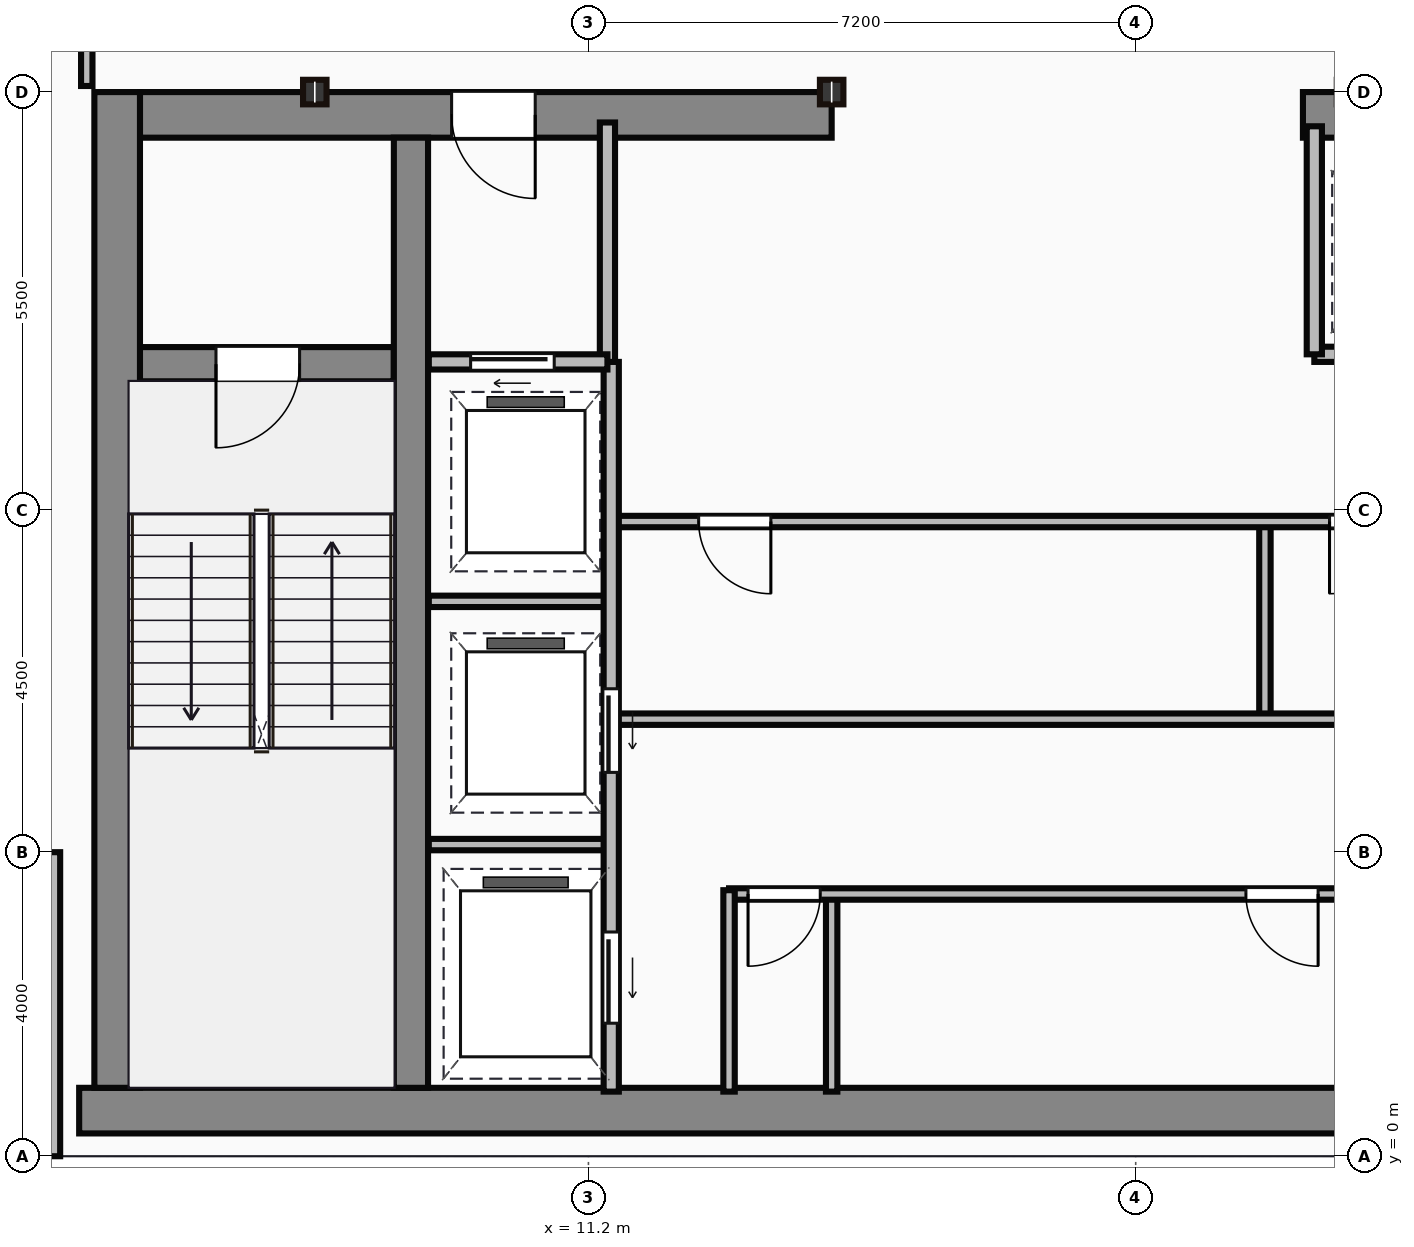
"""IFC4 building model, lengths in metres.
Left out: names, types, materials, properties, quantities, classifications, styles, units other than length and angle.
Written with IfcOpenShell. Run it as: python <this file> out.ifc"""

import sys

from ifc_helpers import new_model, si_unit, direction, frame, frame_2d, origin, origin_2d, place, context, subcontext, project, spatial, rectangle, i_section, extrude, source, transform, mapped, element, fill, save


model = new_model("IFC4")
c1 = context("Model", 3, precision=1e-05, world=origin(), true_north=direction((0.0, 1.0)))
c2 = subcontext(c1, "Body", "Model", "MODEL_VIEW")
j1 = project(units=[si_unit("LENGTHUNIT", "METRE"), si_unit("PLANEANGLEUNIT", "RADIAN")], contexts=[c1])
p1 = place(None, origin())
s1 = spatial("IfcSite", under=j1, at=p1, CompositionType="ELEMENT")
p2 = place(p1, origin())
s2 = spatial("IfcBuilding", under=s1, at=p2, CompositionType="ELEMENT")
p3 = place(p2, frame((0.0, 0.0, 288.0)))
s3 = spatial("IfcBuildingStorey", under=s2, at=p3, CompositionType="ELEMENT", Elevation=288.0)
m1 = source(origin(), c2, "Body", "SweptSolid", [
    extrude(rectangle(XDim=29.5, YDim=0.6, at=frame_2d((14.75, 0.0))), origin(), (0.0, 0.0, 1.0), 4.25),
])
p4 = place(p3, frame((4.5, 0.6, 0.0), z_axis=(0.0, 0.0, 1.0), x_axis=(1.0, 0.0, 0.0)))
e1 = element("IfcWall", 1, at=p4, inside=s3, PredefinedType="SHEAR", context=c2, shape_type="MappedRepresentation", body=[
    mapped(m1, transform((0.0, 0.0, 0.0))),
])
m2 = source(origin(), c2, "Body", "SweptSolid", [
    extrude(rectangle(XDim=13.1, YDim=0.6, at=frame_2d((6.55, 0.0))), origin(), (0.0, 0.0, 1.0), 4.25),
])
p5 = place(p3, frame((5.0, 0.9, 0.0), z_axis=(0.0, 0.0, 1.0), x_axis=(0.0, 1.0, 0.0)))
e2 = element("IfcWall", 2, at=p5, inside=s3, PredefinedType="SHEAR", context=c2, shape_type="MappedRepresentation", body=[
    mapped(m2, transform((0.0, 0.0, 0.0))),
])
m3 = source(origin(), c2, "Body", "SweptSolid", [
    extrude(rectangle(XDim=9.1, YDim=0.6, at=frame_2d((4.55, 0.0))), origin(), (0.0, 0.0, 1.0), 4.25),
])
p6 = place(p3, frame((5.3, 13.7, 0.0), z_axis=(0.0, 0.0, 1.0), x_axis=(1.0, 0.0, 0.0)))
e3 = element("IfcWall", 3, at=p6, inside=s3, PredefinedType="SHEAR", context=c2, shape_type="MappedRepresentation", body=[
    mapped(m3, transform((0.0, 0.0, 0.0))),
])
p7 = place(p6, frame((4.1, 0.0, 0.0)))
e4 = element("IfcOpeningElement", 4, at=p7, cuts=e3, PredefinedType="OPENING", context=c2, shape_type="SweptSolid", body=[
    extrude(rectangle(XDim=1.1, YDim=2.15, at=frame_2d((0.55, 1.075))), frame((0.0, 0.31, 0.0), z_axis=(0.0, -1.0, 0.0), x_axis=(1.0, 0.0, 0.0)), (0.0, 0.0, 1.0), 0.62),
])
m4 = source(origin(), c2, "Body", "SweptSolid", [
    extrude(rectangle(XDim=12.6, YDim=0.6, at=frame_2d((6.3, 0.0))), origin(), (0.0, 0.0, 1.0), 4.25),
])
p8 = place(p3, frame((20.6, 13.7, 0.0), z_axis=(0.0, 0.0, 1.0), x_axis=(1.0, 0.0, 0.0)))
e5 = element("IfcWall", 5, at=p8, inside=s3, PredefinedType="SHEAR", context=c2, shape_type="MappedRepresentation", body=[
    mapped(m4, transform((0.0, 0.0, 0.0))),
])
p9 = place(p8, frame((9.25, 0.0, 0.0)))
e6 = element("IfcOpeningElement", 6, at=p9, cuts=e5, PredefinedType="OPENING", context=c2, shape_type="SweptSolid", body=[
    extrude(rectangle(XDim=1.1, YDim=2.15, at=frame_2d((0.55, 1.075))), frame((0.0, 0.31, 0.0), z_axis=(0.0, -1.0, 0.0), x_axis=(1.0, 0.0, 0.0)), (0.0, 0.0, 1.0), 0.62),
])
m5 = source(origin(), c2, "Body", "SweptSolid", [
    extrude(rectangle(XDim=12.5, YDim=0.45, at=frame_2d((6.25, 0.0))), origin(), (0.0, 0.0, 1.0), 4.25),
])
p10 = place(p3, frame((8.865, 0.9, 0.0), z_axis=(0.0, 0.0, 1.0), x_axis=(0.0, 1.0, 0.0)))
e7 = element("IfcWall", 7, at=p10, inside=s3, PredefinedType="SHEAR", context=c2, shape_type="MappedRepresentation", body=[
    mapped(m5, transform((0.0, 0.0, 0.0))),
])
m6 = source(origin(), c2, "Body", "SweptSolid", [
    extrude(rectangle(XDim=3.39, YDim=0.45, at=frame_2d((1.695, 0.0))), origin(), (0.0, 0.0, 1.0), 4.25),
])
p11 = place(p3, frame((5.25, 10.42, 0.0), z_axis=(0.0, 0.0, 1.0), x_axis=(1.0, 0.0, 0.0)))
e8 = element("IfcWall", 8, at=p11, inside=s3, PredefinedType="SHEAR", context=c2, shape_type="MappedRepresentation", body=[
    mapped(m6, transform((0.0, 0.0, 0.0))),
])
p12 = place(p11, frame((1.05, 0.0, 0.0)))
e9 = element("IfcOpeningElement", 9, at=p12, cuts=e8, PredefinedType="OPENING", context=c2, shape_type="SweptSolid", body=[
    extrude(rectangle(XDim=1.1, YDim=2.15, at=frame_2d((0.55, 1.075))), frame((0.0, 0.235, 0.0), z_axis=(0.0, -1.0, 0.0), x_axis=(1.0, 0.0, 0.0)), (0.0, 0.0, 1.0), 0.47),
])
m7 = source(origin(), c2, "Body", "SweptSolid", [
    extrude(i_section(OverallWidth=0.309, OverallDepth=0.323, WebThickness=0.014, FlangeThickness=0.023, at=origin_2d()), origin(), (0.0, 0.0, 1.0), 4.25),
])
for number, where, z_axis, x_axis in (
    (10, (7.6, 14.0, 0.0), (0.0, 0.0, 1.0), (1.0, 0.0, 0.0)),
    (11, (14.4, 14.0, 0.0), (0.0, 0.0, 1.0), (1.0, 0.0, 0.0)),
):
    element("IfcColumn", number, at=place(p3, frame(where, z_axis=z_axis, x_axis=x_axis)), inside=s3, PredefinedType="COLUMN", context=c2, shape_type="MappedRepresentation", body=[
        mapped(m7, transform((0.0, 0.0, 0.0))),
    ])
m8 = source(origin(), c2, "Body", "SweptSolid", [
    extrude(rectangle(XDim=4.0, YDim=0.25, at=frame_2d((2.0, 0.0))), origin(), (0.0, 0.0, 1.0), 3.85),
])
p13 = place(p3, frame((4.125, 4.0, 0.0), z_axis=(0.0, 0.0, 1.0), x_axis=(0.0, -1.0, 0.0)))
e12 = element("IfcWall", 12, at=p13, inside=s3, PredefinedType="STANDARD", context=c2, shape_type="MappedRepresentation", body=[
    mapped(m8, transform((0.0, 0.0, 0.0))),
])
m9 = source(origin(), c2, "Body", "SweptSolid", [
    extrude(rectangle(XDim=3.18, YDim=0.2, at=frame_2d((1.59, 0.0))), origin(), (0.0, 0.0, 1.0), 3.85),
])
p14 = place(p3, frame((11.45, 10.42, 0.0), z_axis=(0.0, 0.0, 1.0), x_axis=(0.0, 1.0, 0.0)))
e13 = element("IfcWall", 13, at=p14, inside=s3, PredefinedType="PARTITIONING", context=c2, shape_type="MappedRepresentation", body=[
    mapped(m9, transform((0.0, 0.0, 0.0))),
])
m10 = source(origin(), c2, "Body", "SweptSolid", [
    extrude(rectangle(XDim=2.35, YDim=0.2, at=frame_2d((1.175, 0.0))), origin(), (0.0, 0.0, 1.0), 3.85),
])
p15 = place(p3, frame((9.1, 10.45, 0.0), z_axis=(0.0, 0.0, 1.0), x_axis=(1.0, 0.0, 0.0)))
e14 = element("IfcWall", 14, at=p15, inside=s3, PredefinedType="PARTITIONING", context=c2, shape_type="MappedRepresentation", body=[
    mapped(m10, transform((0.0, 0.0, 0.0))),
])
p16 = place(p15, frame((0.55, 0.0, 0.0)))
e15 = element("IfcOpeningElement", 15, at=p16, cuts=e14, PredefinedType="OPENING", context=c2, shape_type="SweptSolid", body=[
    extrude(rectangle(XDim=1.1, YDim=2.15, at=frame_2d((0.55, 1.075))), frame((0.0, 0.11, 0.0), z_axis=(0.0, -1.0, 0.0), x_axis=(1.0, 0.0, 0.0)), (0.0, 0.0, 1.0), 0.22),
])
m11 = source(origin(), c2, "Body", "SweptSolid", [
    extrude(rectangle(XDim=9.6, YDim=0.2, at=frame_2d((4.8, 0.0))), origin(), (0.0, 0.0, 1.0), 3.85),
])
p17 = place(p3, frame((11.5, 0.85, 0.0), z_axis=(0.0, 0.0, 1.0), x_axis=(0.0, 1.0, 0.0)))
e16 = element("IfcWall", 16, at=p17, inside=s3, PredefinedType="PARTITIONING", context=c2, shape_type="MappedRepresentation", body=[
    mapped(m11, transform((0.0, 0.0, 0.0))),
])
p18 = place(p17, frame((4.2, 0.0, 0.0)))
e17 = element("IfcOpeningElement", 17, at=p18, cuts=e16, PredefinedType="OPENING", context=c2, shape_type="SweptSolid", body=[
    extrude(rectangle(XDim=1.1, YDim=2.15, at=frame_2d((0.55, 1.075))), frame((0.0, 0.11, 0.0), z_axis=(0.0, -1.0, 0.0), x_axis=(1.0, 0.0, 0.0)), (0.0, 0.0, 1.0), 0.22),
])
p19 = place(p17, frame((0.9, 0.0, 0.0)))
e18 = element("IfcOpeningElement", 18, at=p19, cuts=e16, PredefinedType="OPENING", context=c2, shape_type="SweptSolid", body=[
    extrude(rectangle(XDim=1.2, YDim=2.15, at=frame_2d((0.6, 1.075))), frame((0.0, 0.11, 0.0), z_axis=(0.0, -1.0, 0.0), x_axis=(1.0, 0.0, 0.0)), (0.0, 0.0, 1.0), 0.22),
])
m12 = source(origin(), c2, "Body", "SweptSolid", [
    extrude(rectangle(XDim=2.4, YDim=0.15, at=frame_2d((1.2, 0.0))), origin(), (0.0, 0.0, 1.0), 3.85),
])
for number, where, z_axis, x_axis in (
    (19, (9.1, 4.1, 0.0), (0.0, 0.0, 1.0), (1.0, 0.0, 0.0)),
    (20, (9.1, 7.3, 0.0), (0.0, 0.0, 1.0), (1.0, 0.0, 0.0)),
):
    element("IfcWall", number, at=place(p3, frame(where, z_axis=z_axis, x_axis=x_axis)), inside=s3, PredefinedType="PARTITIONING", context=c2, shape_type="MappedRepresentation", body=[
        mapped(m12, transform((0.0, 0.0, 0.0))),
    ])
m13 = source(origin(), c2, "Body", "SweptSolid", [
    extrude(rectangle(XDim=2.65, YDim=0.15, at=frame_2d((1.325, 0.0))), origin(), (0.0, 0.0, 1.0), 3.85),
])
p20 = place(p3, frame((13.05, 0.85, 0.0), z_axis=(0.0, 0.0, 1.0), x_axis=(0.0, 1.0, 0.0)))
e21 = element("IfcWall", 21, at=p20, inside=s3, PredefinedType="PARTITIONING", context=c2, shape_type="MappedRepresentation", body=[
    mapped(m13, transform((0.0, 0.0, 0.0))),
])
m14 = source(origin(), c2, "Body", "SweptSolid", [
    extrude(rectangle(XDim=10.35, YDim=0.15, at=frame_2d((5.175, 0.0))), origin(), (0.0, 0.0, 1.0), 3.85),
])
p21 = place(p3, frame((13.05, 3.45, 0.0), z_axis=(0.0, 0.0, 1.0), x_axis=(1.0, 0.0, 0.0)))
e22 = element("IfcWall", 22, at=p21, inside=s3, PredefinedType="PARTITIONING", context=c2, shape_type="MappedRepresentation", body=[
    mapped(m14, transform((0.0, 0.0, 0.0))),
])
p22 = place(p21, frame((0.25, 0.0, 0.0)))
e23 = element("IfcOpeningElement", 23, at=p22, cuts=e22, PredefinedType="OPENING", context=c2, shape_type="SweptSolid", body=[
    extrude(rectangle(XDim=0.95, YDim=2.15, at=frame_2d((0.475, 1.075))), frame((0.0, 0.085, 0.0), z_axis=(0.0, -1.0, 0.0), x_axis=(1.0, 0.0, 0.0)), (0.0, 0.0, 1.0), 0.17),
])
p23 = place(p21, frame((6.8, 0.0, 0.0)))
e24 = element("IfcOpeningElement", 24, at=p23, cuts=e22, PredefinedType="OPENING", context=c2, shape_type="SweptSolid", body=[
    extrude(rectangle(XDim=0.95, YDim=2.15, at=frame_2d((0.475, 1.075))), frame((0.0, 0.085, 0.0), z_axis=(0.0, -1.0, 0.0), x_axis=(1.0, 0.0, 0.0)), (0.0, 0.0, 1.0), 0.17),
])
m15 = source(origin(), c2, "Body", "SweptSolid", [
    extrude(rectangle(XDim=2.6, YDim=0.15, at=frame_2d((1.3, 0.0))), origin(), (0.0, 0.0, 1.0), 3.85),
])
p24 = place(p3, frame((14.4, 0.85, 0.0), z_axis=(0.0, 0.0, 1.0), x_axis=(0.0, 1.0, 0.0)))
e25 = element("IfcWall", 25, at=p24, inside=s3, PredefinedType="PARTITIONING", context=c2, shape_type="MappedRepresentation", body=[
    mapped(m15, transform((0.0, 0.0, 0.0))),
])
m16 = source(origin(), c2, "Body", "SweptSolid", [
    extrude(rectangle(XDim=11.85, YDim=0.15, at=frame_2d((5.925, 0.0))), origin(), (0.0, 0.0, 1.0), 3.85),
])
p25 = place(p3, frame((11.55, 5.75, 0.0), z_axis=(0.0, 0.0, 1.0), x_axis=(1.0, 0.0, 0.0)))
e26 = element("IfcWall", 26, at=p25, inside=s3, PredefinedType="PARTITIONING", context=c2, shape_type="MappedRepresentation", body=[
    mapped(m16, transform((0.0, 0.0, 0.0))),
])
p26 = place(p3, frame((11.55, 8.35, 0.0), z_axis=(0.0, 0.0, 1.0), x_axis=(1.0, 0.0, 0.0)))
e27 = element("IfcWall", 27, at=p26, inside=s3, PredefinedType="PARTITIONING", context=c2, shape_type="MappedRepresentation", body=[
    mapped(m16, transform((0.0, 0.0, 0.0))),
])
p27 = place(p26, frame((1.1, 0.0, 0.0)))
e28 = element("IfcOpeningElement", 28, at=p27, cuts=e27, PredefinedType="OPENING", context=c2, shape_type="SweptSolid", body=[
    extrude(rectangle(XDim=0.95, YDim=2.15, at=frame_2d((0.475, 1.075))), frame((0.0, 0.085, 0.0), z_axis=(0.0, -1.0, 0.0), x_axis=(1.0, 0.0, 0.0)), (0.0, 0.0, 1.0), 0.17),
])
p28 = place(p26, frame((9.4, 0.0, 0.0)))
e29 = element("IfcOpeningElement", 29, at=p28, cuts=e27, PredefinedType="OPENING", context=c2, shape_type="SweptSolid", body=[
    extrude(rectangle(XDim=0.95, YDim=2.15, at=frame_2d((0.475, 1.075))), frame((0.0, 0.085, 0.0), z_axis=(0.0, -1.0, 0.0), x_axis=(1.0, 0.0, 0.0)), (0.0, 0.0, 1.0), 0.17),
])
m17 = source(origin(), c2, "Body", "SweptSolid", [
    extrude(rectangle(XDim=2.5, YDim=0.15, at=frame_2d((1.25, 0.0))), origin(), (0.0, 0.0, 1.0), 3.85),
])
p29 = place(p3, frame((20.1, 5.8, 0.0), z_axis=(0.0, 0.0, 1.0), x_axis=(0.0, 1.0, 0.0)))
e30 = element("IfcWall", 30, at=p29, inside=s3, PredefinedType="PARTITIONING", context=c2, shape_type="MappedRepresentation", body=[
    mapped(m17, transform((0.0, 0.0, 0.0))),
])
m18 = source(origin(), c2, "Body", "SweptSolid", [
    extrude(rectangle(XDim=8.8, YDim=0.2, at=frame_2d((4.4, 0.0))), origin(), (0.0, 0.0, 1.0), 3.85),
])
p30 = place(p3, frame((20.75, 10.55, 0.0), z_axis=(0.0, 0.0, 1.0), x_axis=(1.0, 0.0, 0.0)))
e31 = element("IfcWall", 31, at=p30, inside=s3, PredefinedType="PARTITIONING", context=c2, shape_type="MappedRepresentation", body=[
    mapped(m18, transform((0.0, 0.0, 0.0))),
])
p31 = place(p30, frame((0.5, 0.0, 0.0)))
e32 = element("IfcOpeningElement", 32, at=p31, cuts=e31, PredefinedType="OPENING", context=c2, shape_type="SweptSolid", body=[
    extrude(rectangle(XDim=1.05, YDim=2.15, at=frame_2d((0.525, 1.075))), frame((0.0, 0.11, 0.0), z_axis=(0.0, -1.0, 0.0), x_axis=(1.0, 0.0, 0.0)), (0.0, 0.0, 1.0), 0.22),
])
p32 = place(p30, frame((2.6, 0.0, 0.0)))
e33 = element("IfcOpeningElement", 33, at=p32, cuts=e31, PredefinedType="OPENING", context=c2, shape_type="SweptSolid", body=[
    extrude(rectangle(XDim=1.05, YDim=2.15, at=frame_2d((0.525, 1.075))), frame((0.0, 0.11, 0.0), z_axis=(0.0, -1.0, 0.0), x_axis=(1.0, 0.0, 0.0)), (0.0, 0.0, 1.0), 0.22),
])
p33 = place(p30, frame((4.7, 0.0, 0.0)))
e34 = element("IfcOpeningElement", 34, at=p33, cuts=e31, PredefinedType="OPENING", context=c2, shape_type="SweptSolid", body=[
    extrude(rectangle(XDim=1.05, YDim=2.15, at=frame_2d((0.525, 1.075))), frame((0.0, 0.11, 0.0), z_axis=(0.0, -1.0, 0.0), x_axis=(1.0, 0.0, 0.0)), (0.0, 0.0, 1.0), 0.22),
])
p34 = place(p30, frame((6.8, 0.0, 0.0)))
e35 = element("IfcOpeningElement", 35, at=p34, cuts=e31, PredefinedType="OPENING", context=c2, shape_type="SweptSolid", body=[
    extrude(rectangle(XDim=1.05, YDim=2.15, at=frame_2d((0.525, 1.075))), frame((0.0, 0.11, 0.0), z_axis=(0.0, -1.0, 0.0), x_axis=(1.0, 0.0, 0.0)), (0.0, 0.0, 1.0), 0.22),
])
m19 = source(origin(), c2, "Body", "SweptSolid", [
    extrude(rectangle(XDim=3.0, YDim=0.2, at=frame_2d((1.5, 0.0))), origin(), (0.0, 0.0, 1.0), 3.85),
])
p35 = place(p3, frame((20.75, 10.55, 0.0), z_axis=(0.0, 0.0, 1.0), x_axis=(0.0, 1.0, 0.0)))
e36 = element("IfcWall", 36, at=p35, inside=s3, PredefinedType="PARTITIONING", context=c2, shape_type="MappedRepresentation", body=[
    mapped(m19, transform((0.0, 0.0, 0.0))),
])
m20 = source(origin(), c2, "Body", "SweptSolid", [
    extrude(rectangle(XDim=2.12, YDim=0.15, at=frame_2d((1.06, 0.0))), origin(), (0.0, 0.0, 1.0), 3.85),
])
p36 = place(p3, frame((4.6, 14.08, 0.0), z_axis=(0.0, 0.0, 1.0), x_axis=(0.0, 1.0, 0.0)))
e37 = element("IfcWall", 37, at=p36, inside=s3, PredefinedType="PARTITIONING", context=c2, shape_type="MappedRepresentation", body=[
    mapped(m20, transform((0.0, 0.0, 0.0))),
])
m21 = source(origin(), c2, "Body", "SweptSolid", [
    extrude(rectangle(XDim=1.1, YDim=2.15, at=frame_2d((0.55, 1.075))), frame((0.0, 0.025, 0.0), z_axis=(0.0, -1.0, 0.0), x_axis=(1.0, 0.0, 0.0)), (0.0, 0.0, 1.0), 0.05),
])
p37 = place(p12, frame((1.1, 0.0, 0.0), z_axis=(0.0, 0.0, 1.0), x_axis=(-1.0, 0.0, 0.0)))
e38 = element("IfcDoor", 38, at=p37, inside=s3, OperationType="SINGLE_SWING_LEFT", PredefinedType="DOOR", context=c2, shape_type="MappedRepresentation", body=[
    mapped(m21, transform((0.0, 0.0, 0.0))),
])
fill(e9, e38)
p38 = place(p7, origin())
e39 = element("IfcDoor", 39, at=p38, inside=s3, OperationType="SINGLE_SWING_RIGHT", PredefinedType="DOOR", context=c2, shape_type="MappedRepresentation", body=[
    mapped(m21, transform((0.0, 0.0, 0.0))),
])
fill(e4, e39)
p39 = place(p16, origin())
e40 = element("IfcDoor", 40, at=p39, inside=s3, OperationType="SLIDING_TO_LEFT", PredefinedType="DOOR", context=c2, shape_type="MappedRepresentation", body=[
    mapped(m21, transform((0.0, 0.0, 0.0))),
])
fill(e15, e40)
p40 = place(p18, frame((1.1, 0.0, 0.0), z_axis=(0.0, 0.0, 1.0), x_axis=(-1.0, 0.0, 0.0)))
e41 = element("IfcDoor", 41, at=p40, inside=s3, OperationType="SLIDING_TO_LEFT", PredefinedType="DOOR", context=c2, shape_type="MappedRepresentation", body=[
    mapped(m21, transform((0.0, 0.0, 0.0))),
])
fill(e17, e41)
m22 = source(origin(), c2, "Body", "SweptSolid", [
    extrude(rectangle(XDim=1.2, YDim=2.15, at=frame_2d((0.6, 1.075))), frame((0.0, 0.025, 0.0), z_axis=(0.0, -1.0, 0.0), x_axis=(1.0, 0.0, 0.0)), (0.0, 0.0, 1.0), 0.05),
])
p41 = place(p19, frame((1.2, 0.0, 0.0), z_axis=(0.0, 0.0, 1.0), x_axis=(-1.0, 0.0, 0.0)))
e42 = element("IfcDoor", 42, at=p41, inside=s3, OperationType="SLIDING_TO_LEFT", PredefinedType="DOOR", context=c2, shape_type="MappedRepresentation", body=[
    mapped(m22, transform((0.0, 0.0, 0.0))),
])
fill(e18, e42)
m23 = source(origin(), c2, "Body", "SweptSolid", [
    extrude(rectangle(XDim=0.95, YDim=2.15, at=frame_2d((0.475, 1.075))), frame((0.0, 0.025, 0.0), z_axis=(0.0, -1.0, 0.0), x_axis=(1.0, 0.0, 0.0)), (0.0, 0.0, 1.0), 0.05),
])
p42 = place(p22, origin())
e43 = element("IfcDoor", 43, at=p42, inside=s3, OperationType="SINGLE_SWING_LEFT", PredefinedType="DOOR", context=c2, shape_type="MappedRepresentation", body=[
    mapped(m23, transform((0.0, 0.0, 0.0))),
])
fill(e23, e43)
p43 = place(p23, origin())
e44 = element("IfcDoor", 44, at=p43, inside=s3, OperationType="SINGLE_SWING_RIGHT", PredefinedType="DOOR", context=c2, shape_type="MappedRepresentation", body=[
    mapped(m23, transform((0.0, 0.0, 0.0))),
])
fill(e24, e44)
p44 = place(p27, origin())
e45 = element("IfcDoor", 45, at=p44, inside=s3, OperationType="SINGLE_SWING_RIGHT", PredefinedType="DOOR", context=c2, shape_type="MappedRepresentation", body=[
    mapped(m23, transform((0.0, 0.0, 0.0))),
])
fill(e28, e45)
p45 = place(p28, origin())
e46 = element("IfcDoor", 46, at=p45, inside=s3, OperationType="SINGLE_SWING_LEFT", PredefinedType="DOOR", context=c2, shape_type="MappedRepresentation", body=[
    mapped(m23, transform((0.0, 0.0, 0.0))),
])
fill(e29, e46)
save(model, sys.argv[1])
